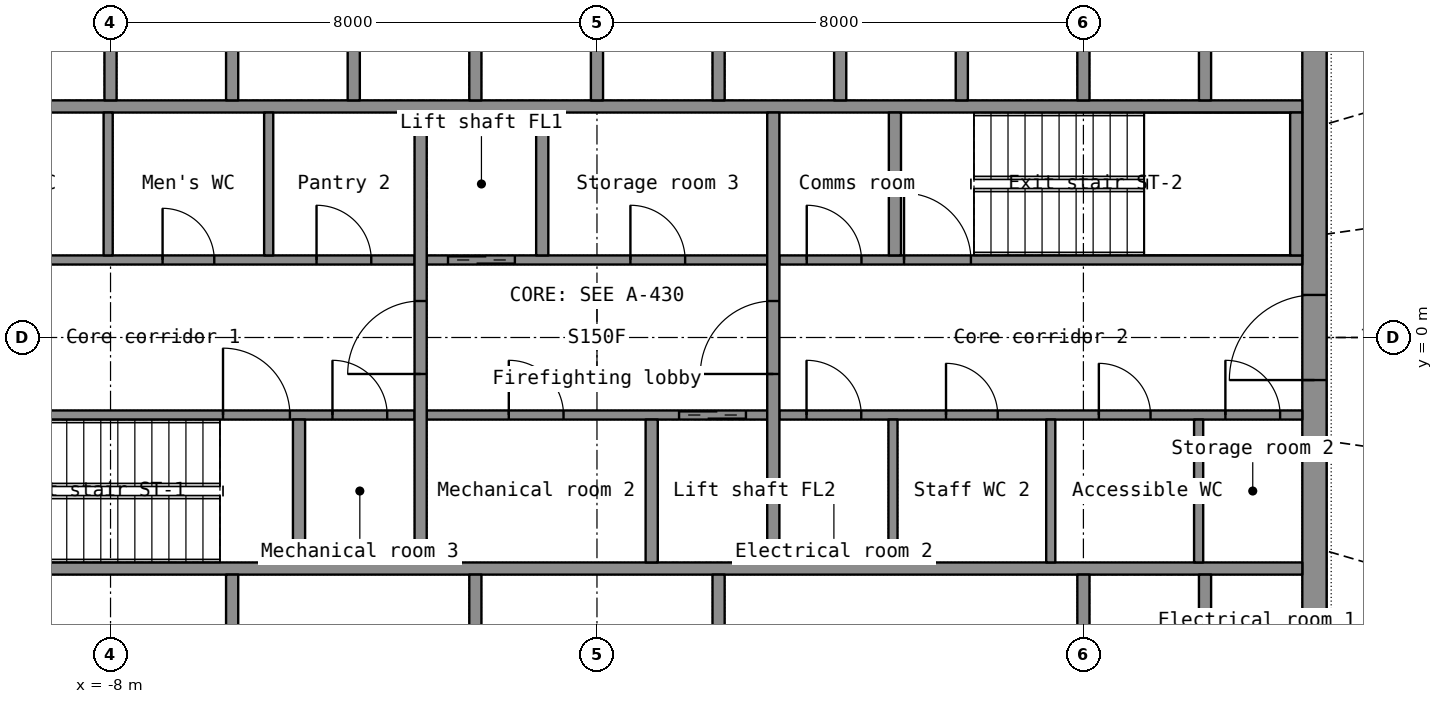
"""IFC4 building model, lengths in metres.
Left out: names, types, materials, properties, quantities, classifications, styles, units other than length and angle.
Written with IfcOpenShell. Run it as: python <this file> out.ifc"""

import sys

from ifc_helpers import new_model, si_unit, direction, frame, frame_2d, origin, place, context, subcontext, project, spatial, rectangle, extrude, element, fill, save


model = new_model("IFC4")
c1 = context("Model", 3, precision=1e-05, world=origin(), true_north=direction((0.0, 1.0)))
c2 = subcontext(c1, "Body", "Model", "MODEL_VIEW")
j1 = project(units=[si_unit("LENGTHUNIT", "METRE"), si_unit("PLANEANGLEUNIT", "RADIAN")], contexts=[c1])
p1 = place(None, origin())
s1 = spatial("IfcSite", under=j1, at=p1, CompositionType="ELEMENT")
p2 = place(p1, origin())
s2 = spatial("IfcBuilding", under=s1, at=p2, CompositionType="ELEMENT")
p3 = place(p2, frame((0.0, 0.0, 231.9)))
s3 = spatial("IfcBuildingStorey", under=s2, at=p3, CompositionType="ELEMENT", Elevation=231.9)
p4 = place(p3, frame((11.8, -7.2, 0.0), z_axis=(0.0, 0.0, 1.0), x_axis=(0.0, 1.0, 0.0)))
e1 = element("IfcWall", 1, at=p4, inside=s3, PredefinedType="SHEAR", context=c2, shape_type="SweptSolid", body=[
    extrude(rectangle(XDim=14.4, YDim=0.4, at=frame_2d((7.2, 0.0))), origin(), (0.0, 0.0, 1.0), 3.3),
])
p5 = place(p4, frame((6.5, 0.0, 0.0)))
e2 = element("IfcOpeningElement", 2, at=p5, cuts=e1, PredefinedType="OPENING", context=c2, shape_type="SweptSolid", body=[
    extrude(rectangle(XDim=1.4, YDim=2.2, at=frame_2d((0.7, 1.1))), frame((0.0, 0.21, 0.0), z_axis=(0.0, -1.0, 0.0), x_axis=(1.0, 0.0, 0.0)), (0.0, 0.0, 1.0), 0.42),
])
for number, where, z_axis, x_axis in (
    (3, (-11.6, -3.8, 0.0), (0.0, 0.0, 1.0), (1.0, 0.0, 0.0)),
    (4, (-11.6, 3.8, 0.0), (0.0, 0.0, 1.0), (1.0, 0.0, 0.0)),
):
    element("IfcWall", number, at=place(p3, frame(where, z_axis=z_axis, x_axis=x_axis)), inside=s3, PredefinedType="SHEAR", context=c2, shape_type="SweptSolid", body=[
        extrude(rectangle(XDim=23.2, YDim=0.2, at=frame_2d((11.6, 0.0))), origin(), (0.0, 0.0, 1.0), 3.3),
    ])
for number, where, z_axis, x_axis in (
    (5, (8.0, -6.8, 0.0), (0.0, 0.0, 1.0), (0.0, 1.0, 0.0)),
    (6, (10.0, -6.8, 0.0), (0.0, 0.0, 1.0), (0.0, 1.0, 0.0)),
):
    element("IfcWall", number, at=place(p3, frame(where, z_axis=z_axis, x_axis=x_axis)), inside=s3, PredefinedType="SHEAR", context=c2, shape_type="SweptSolid", body=[
        extrude(rectangle(XDim=2.9, YDim=0.2, at=frame_2d((1.45, 0.0))), origin(), (0.0, 0.0, 1.0), 3.3),
    ])
for number, where, z_axis, x_axis in (
    (7, (-6.0, -6.8, 0.0), (0.0, 0.0, 1.0), (0.0, 1.0, 0.0)),
    (8, (-2.0, -6.8, 0.0), (0.0, 0.0, 1.0), (0.0, 1.0, 0.0)),
    (9, (2.0, -6.8, 0.0), (0.0, 0.0, 1.0), (0.0, 1.0, 0.0)),
):
    element("IfcWall", number, at=place(p3, frame(where, z_axis=z_axis, x_axis=x_axis)), inside=s3, PredefinedType="PARTITIONING", context=c2, shape_type="SweptSolid", body=[
        extrude(rectangle(XDim=2.9, YDim=0.2, at=frame_2d((1.45, 0.0))), origin(), (0.0, 0.0, 1.0), 3.3),
    ])
for number, where, z_axis, x_axis in (
    (10, (-8.0, 3.9, 0.0), (0.0, 0.0, 1.0), (0.0, 1.0, 0.0)),
    (11, (-6.0, 3.9, 0.0), (0.0, 0.0, 1.0), (0.0, 1.0, 0.0)),
    (12, (-4.0, 3.9, 0.0), (0.0, 0.0, 1.0), (0.0, 1.0, 0.0)),
    (13, (-2.0, 3.9, 0.0), (0.0, 0.0, 1.0), (0.0, 1.0, 0.0)),
    (14, (0.0, 3.9, 0.0), (0.0, 0.0, 1.0), (0.0, 1.0, 0.0)),
    (15, (2.0, 3.9, 0.0), (0.0, 0.0, 1.0), (0.0, 1.0, 0.0)),
    (16, (4.0, 3.9, 0.0), (0.0, 0.0, 1.0), (0.0, 1.0, 0.0)),
    (17, (6.0, 3.9, 0.0), (0.0, 0.0, 1.0), (0.0, 1.0, 0.0)),
    (18, (8.0, 3.9, 0.0), (0.0, 0.0, 1.0), (0.0, 1.0, 0.0)),
    (19, (10.0, 3.9, 0.0), (0.0, 0.0, 1.0), (0.0, 1.0, 0.0)),
):
    element("IfcWall", number, at=place(p3, frame(where, z_axis=z_axis, x_axis=x_axis)), inside=s3, PredefinedType="SHEAR", context=c2, shape_type="SweptSolid", body=[
        extrude(rectangle(XDim=2.9, YDim=0.2, at=frame_2d((1.45, 0.0))), origin(), (0.0, 0.0, 1.0), 3.3),
    ])
p6 = place(p3, frame((-11.6, -1.275, 0.0), z_axis=(0.0, 0.0, 1.0), x_axis=(1.0, 0.0, 0.0)))
e20 = element("IfcWall", 20, at=p6, inside=s3, PredefinedType="SHEAR", context=c2, shape_type="SweptSolid", body=[
    extrude(rectangle(XDim=8.6, YDim=0.15, at=frame_2d((4.3, 0.0))), origin(), (0.0, 0.0, 1.0), 3.3),
])
p7 = place(p6, frame((5.45, 0.0, 0.0)))
e21 = element("IfcOpeningElement", 21, at=p7, cuts=e20, PredefinedType="OPENING", context=c2, shape_type="SweptSolid", body=[
    extrude(rectangle(XDim=1.1, YDim=2.15, at=frame_2d((0.55, 1.075))), frame((0.0, 0.085, 0.0), z_axis=(0.0, -1.0, 0.0), x_axis=(1.0, 0.0, 0.0)), (0.0, 0.0, 1.0), 0.17),
])
p8 = place(p6, frame((7.25, 0.0, 0.0)))
e22 = element("IfcOpeningElement", 22, at=p8, cuts=e20, PredefinedType="OPENING", context=c2, shape_type="SweptSolid", body=[
    extrude(rectangle(XDim=0.9, YDim=2.1, at=frame_2d((0.45, 1.05))), frame((0.0, 0.085, 0.0), z_axis=(0.0, -1.0, 0.0), x_axis=(1.0, 0.0, 0.0)), (0.0, 0.0, 1.0), 0.17),
])
p9 = place(p3, frame((-2.8, -1.275, 0.0), z_axis=(0.0, 0.0, 1.0), x_axis=(1.0, 0.0, 0.0)))
e23 = element("IfcWall", 23, at=p9, inside=s3, PredefinedType="SHEAR", context=c2, shape_type="SweptSolid", body=[
    extrude(rectangle(XDim=5.6, YDim=0.15, at=frame_2d((2.8, 0.0))), origin(), (0.0, 0.0, 1.0), 3.3),
])
p10 = place(p9, frame((4.15, 0.0, 0.0)))
e24 = element("IfcOpeningElement", 24, at=p10, cuts=e23, PredefinedType="OPENING", context=c2, shape_type="SweptSolid", body=[
    extrude(rectangle(XDim=1.1, YDim=2.2, at=frame_2d((0.55, 1.1))), frame((0.0, 0.085, 0.0), z_axis=(0.0, -1.0, 0.0), x_axis=(1.0, 0.0, 0.0)), (0.0, 0.0, 1.0), 0.17),
])
p11 = place(p9, frame((1.35, 0.0, 0.0)))
e25 = element("IfcOpeningElement", 25, at=p11, cuts=e23, PredefinedType="OPENING", context=c2, shape_type="SweptSolid", body=[
    extrude(rectangle(XDim=0.9, YDim=2.1, at=frame_2d((0.45, 1.05))), frame((0.0, 0.085, 0.0), z_axis=(0.0, -1.0, 0.0), x_axis=(1.0, 0.0, 0.0)), (0.0, 0.0, 1.0), 0.17),
])
p12 = place(p3, frame((3.0, -1.275, 0.0), z_axis=(0.0, 0.0, 1.0), x_axis=(1.0, 0.0, 0.0)))
e26 = element("IfcWall", 26, at=p12, inside=s3, PredefinedType="PARTITIONING", context=c2, shape_type="SweptSolid", body=[
    extrude(rectangle(XDim=8.6, YDim=0.15, at=frame_2d((4.3, 0.0))), origin(), (0.0, 0.0, 1.0), 3.3),
])
p13 = place(p12, frame((0.447, 0.0, 0.0)))
e27 = element("IfcOpeningElement", 27, at=p13, cuts=e26, PredefinedType="OPENING", context=c2, shape_type="SweptSolid", body=[
    extrude(rectangle(XDim=0.9, YDim=2.1, at=frame_2d((0.45, 1.05))), frame((0.0, 0.085, 0.0), z_axis=(0.0, -1.0, 0.0), x_axis=(1.0, 0.0, 0.0)), (0.0, 0.0, 1.0), 0.17),
])
p14 = place(p12, frame((2.74, 0.0, 0.0)))
e28 = element("IfcOpeningElement", 28, at=p14, cuts=e26, PredefinedType="OPENING", context=c2, shape_type="SweptSolid", body=[
    extrude(rectangle(XDim=0.85, YDim=2.1, at=frame_2d((0.425, 1.05))), frame((0.0, 0.085, 0.0), z_axis=(0.0, -1.0, 0.0), x_axis=(1.0, 0.0, 0.0)), (0.0, 0.0, 1.0), 0.17),
])
p15 = place(p12, frame((5.254, 0.0, 0.0)))
e29 = element("IfcOpeningElement", 29, at=p15, cuts=e26, PredefinedType="OPENING", context=c2, shape_type="SweptSolid", body=[
    extrude(rectangle(XDim=0.85, YDim=2.1, at=frame_2d((0.425, 1.05))), frame((0.0, 0.085, 0.0), z_axis=(0.0, -1.0, 0.0), x_axis=(1.0, 0.0, 0.0)), (0.0, 0.0, 1.0), 0.17),
])
p16 = place(p12, frame((7.335, 0.0, 0.0)))
e30 = element("IfcOpeningElement", 30, at=p16, cuts=e26, PredefinedType="OPENING", context=c2, shape_type="SweptSolid", body=[
    extrude(rectangle(XDim=0.9, YDim=2.1, at=frame_2d((0.45, 1.05))), frame((0.0, 0.085, 0.0), z_axis=(0.0, -1.0, 0.0), x_axis=(1.0, 0.0, 0.0)), (0.0, 0.0, 1.0), 0.17),
])
p17 = place(p3, frame((-11.6, 1.275, 0.0), z_axis=(0.0, 0.0, 1.0), x_axis=(1.0, 0.0, 0.0)))
e31 = element("IfcWall", 31, at=p17, inside=s3, PredefinedType="PARTITIONING", context=c2, shape_type="SweptSolid", body=[
    extrude(rectangle(XDim=8.6, YDim=0.15, at=frame_2d((4.3, 0.0))), origin(), (0.0, 0.0, 1.0), 3.3),
])
p18 = place(p17, frame((1.318, 0.0, 0.0)))
e32 = element("IfcOpeningElement", 32, at=p18, cuts=e31, PredefinedType="OPENING", context=c2, shape_type="SweptSolid", body=[
    extrude(rectangle(XDim=0.85, YDim=2.1, at=frame_2d((0.425, 1.05))), frame((0.0, 0.085, 0.0), z_axis=(0.0, -1.0, 0.0), x_axis=(1.0, 0.0, 0.0)), (0.0, 0.0, 1.0), 0.17),
])
p19 = place(p17, frame((4.456, 0.0, 0.0)))
e33 = element("IfcOpeningElement", 33, at=p19, cuts=e31, PredefinedType="OPENING", context=c2, shape_type="SweptSolid", body=[
    extrude(rectangle(XDim=0.85, YDim=2.1, at=frame_2d((0.425, 1.05))), frame((0.0, 0.085, 0.0), z_axis=(0.0, -1.0, 0.0), x_axis=(1.0, 0.0, 0.0)), (0.0, 0.0, 1.0), 0.17),
])
p20 = place(p17, frame((6.988, 0.0, 0.0)))
e34 = element("IfcOpeningElement", 34, at=p20, cuts=e31, PredefinedType="OPENING", context=c2, shape_type="SweptSolid", body=[
    extrude(rectangle(XDim=0.9, YDim=2.1, at=frame_2d((0.45, 1.05))), frame((0.0, 0.085, 0.0), z_axis=(0.0, -1.0, 0.0), x_axis=(1.0, 0.0, 0.0)), (0.0, 0.0, 1.0), 0.17),
])
p21 = place(p3, frame((-2.8, 1.275, 0.0), z_axis=(0.0, 0.0, 1.0), x_axis=(1.0, 0.0, 0.0)))
e35 = element("IfcWall", 35, at=p21, inside=s3, PredefinedType="SHEAR", context=c2, shape_type="SweptSolid", body=[
    extrude(rectangle(XDim=5.6, YDim=0.15, at=frame_2d((2.8, 0.0))), origin(), (0.0, 0.0, 1.0), 3.3),
])
p22 = place(p21, frame((0.35, 0.0, 0.0)))
e36 = element("IfcOpeningElement", 36, at=p22, cuts=e35, PredefinedType="OPENING", context=c2, shape_type="SweptSolid", body=[
    extrude(rectangle(XDim=1.1, YDim=2.2, at=frame_2d((0.55, 1.1))), frame((0.0, 0.085, 0.0), z_axis=(0.0, -1.0, 0.0), x_axis=(1.0, 0.0, 0.0)), (0.0, 0.0, 1.0), 0.17),
])
p23 = place(p21, frame((3.35, 0.0, 0.0)))
e37 = element("IfcOpeningElement", 37, at=p23, cuts=e35, PredefinedType="OPENING", context=c2, shape_type="SweptSolid", body=[
    extrude(rectangle(XDim=0.9, YDim=2.1, at=frame_2d((0.45, 1.05))), frame((0.0, 0.085, 0.0), z_axis=(0.0, -1.0, 0.0), x_axis=(1.0, 0.0, 0.0)), (0.0, 0.0, 1.0), 0.17),
])
p24 = place(p3, frame((3.0, 1.275, 0.0), z_axis=(0.0, 0.0, 1.0), x_axis=(1.0, 0.0, 0.0)))
e38 = element("IfcWall", 38, at=p24, inside=s3, PredefinedType="SHEAR", context=c2, shape_type="SweptSolid", body=[
    extrude(rectangle(XDim=8.6, YDim=0.15, at=frame_2d((4.3, 0.0))), origin(), (0.0, 0.0, 1.0), 3.3),
])
p25 = place(p24, frame((2.05, 0.0, 0.0)))
e39 = element("IfcOpeningElement", 39, at=p25, cuts=e38, PredefinedType="OPENING", context=c2, shape_type="SweptSolid", body=[
    extrude(rectangle(XDim=1.1, YDim=2.15, at=frame_2d((0.55, 1.075))), frame((0.0, 0.085, 0.0), z_axis=(0.0, -1.0, 0.0), x_axis=(1.0, 0.0, 0.0)), (0.0, 0.0, 1.0), 0.17),
])
p26 = place(p24, frame((0.45, 0.0, 0.0)))
e40 = element("IfcOpeningElement", 40, at=p26, cuts=e38, PredefinedType="OPENING", context=c2, shape_type="SweptSolid", body=[
    extrude(rectangle(XDim=0.9, YDim=2.1, at=frame_2d((0.45, 1.05))), frame((0.0, 0.085, 0.0), z_axis=(0.0, -1.0, 0.0), x_axis=(1.0, 0.0, 0.0)), (0.0, 0.0, 1.0), 0.17),
])
p27 = place(p3, frame((-2.9, -3.7, 0.0), z_axis=(0.0, 0.0, 1.0), x_axis=(0.0, 1.0, 0.0)))
e41 = element("IfcWall", 41, at=p27, inside=s3, PredefinedType="SHEAR", context=c2, shape_type="SweptSolid", body=[
    extrude(rectangle(XDim=7.4, YDim=0.2, at=frame_2d((3.7, 0.0))), origin(), (0.0, 0.0, 1.0), 3.3),
])
p28 = place(p27, frame((3.1, 0.0, 0.0)))
e42 = element("IfcOpeningElement", 42, at=p28, cuts=e41, PredefinedType="OPENING", context=c2, shape_type="SweptSolid", body=[
    extrude(rectangle(XDim=1.2, YDim=2.2, at=frame_2d((0.6, 1.1))), frame((0.0, 0.11, 0.0), z_axis=(0.0, -1.0, 0.0), x_axis=(1.0, 0.0, 0.0)), (0.0, 0.0, 1.0), 0.22),
])
p29 = place(p3, frame((2.9, -3.7, 0.0), z_axis=(0.0, 0.0, 1.0), x_axis=(0.0, 1.0, 0.0)))
e43 = element("IfcWall", 43, at=p29, inside=s3, PredefinedType="SHEAR", context=c2, shape_type="SweptSolid", body=[
    extrude(rectangle(XDim=7.4, YDim=0.2, at=frame_2d((3.7, 0.0))), origin(), (0.0, 0.0, 1.0), 3.3),
])
p30 = place(p29, frame((3.1, 0.0, 0.0)))
e44 = element("IfcOpeningElement", 44, at=p30, cuts=e43, PredefinedType="OPENING", context=c2, shape_type="SweptSolid", body=[
    extrude(rectangle(XDim=1.2, YDim=2.2, at=frame_2d((0.6, 1.1))), frame((0.0, 0.11, 0.0), z_axis=(0.0, -1.0, 0.0), x_axis=(1.0, 0.0, 0.0)), (0.0, 0.0, 1.0), 0.22),
])
for number, where, z_axis, x_axis in (
    (45, (-0.9, 1.35, 0.0), (0.0, 0.0, 1.0), (0.0, 1.0, 0.0)),
    (46, (0.9, -3.7, 0.0), (0.0, 0.0, 1.0), (0.0, 1.0, 0.0)),
    (47, (11.5, 1.35, 0.0), (0.0, 0.0, 1.0), (0.0, 1.0, 0.0)),
    (48, (-4.9, -3.7, 0.0), (0.0, 0.0, 1.0), (0.0, 1.0, 0.0)),
    (49, (4.9, 1.35, 0.0), (0.0, 0.0, 1.0), (0.0, 1.0, 0.0)),
):
    element("IfcWall", number, at=place(p3, frame(where, z_axis=z_axis, x_axis=x_axis)), inside=s3, PredefinedType="SHEAR", context=c2, shape_type="SweptSolid", body=[
        extrude(rectangle(XDim=2.35, YDim=0.2, at=frame_2d((1.175, 0.0))), origin(), (0.0, 0.0, 1.0), 3.3),
    ])
for number, where, z_axis, x_axis in (
    (50, (-8.039, 1.35, 0.0), (0.0, 0.0, 1.0), (0.0, 1.0, 0.0)),
    (51, (-5.399, 1.35, 0.0), (0.0, 0.0, 1.0), (0.0, 1.0, 0.0)),
    (52, (4.868, -3.7, 0.0), (0.0, 0.0, 1.0), (0.0, 1.0, 0.0)),
    (53, (7.463, -3.7, 0.0), (0.0, 0.0, 1.0), (0.0, 1.0, 0.0)),
    (54, (9.895, -3.7, 0.0), (0.0, 0.0, 1.0), (0.0, 1.0, 0.0)),
):
    element("IfcWall", number, at=place(p3, frame(where, z_axis=z_axis, x_axis=x_axis)), inside=s3, PredefinedType="PARTITIONING", context=c2, shape_type="SweptSolid", body=[
        extrude(rectangle(XDim=2.35, YDim=0.15, at=frame_2d((1.175, 0.0))), origin(), (0.0, 0.0, 1.0), 3.3),
    ])
p31 = place(p5, origin())
e55 = element("IfcDoor", 55, at=p31, inside=s3, OperationType="DOUBLE_DOOR_SINGLE_SWING", PredefinedType="DOOR", context=c2, shape_type="SweptSolid", body=[
    extrude(rectangle(XDim=1.4, YDim=2.2, at=frame_2d((0.7, 1.1))), frame((0.0, 0.025, 0.0), z_axis=(0.0, -1.0, 0.0), x_axis=(1.0, 0.0, 0.0)), (0.0, 0.0, 1.0), 0.05),
])
fill(e2, e55)
p32 = place(p28, origin())
e56 = element("IfcDoor", 56, at=p32, inside=s3, OperationType="SINGLE_SWING_LEFT", PredefinedType="DOOR", context=c2, shape_type="SweptSolid", body=[
    extrude(rectangle(XDim=1.2, YDim=2.2, at=frame_2d((0.6, 1.1))), frame((0.0, 0.025, 0.0), z_axis=(0.0, -1.0, 0.0), x_axis=(1.0, 0.0, 0.0)), (0.0, 0.0, 1.0), 0.05),
])
fill(e42, e56)
p33 = place(p30, origin())
e57 = element("IfcDoor", 57, at=p33, inside=s3, OperationType="SINGLE_SWING_LEFT", PredefinedType="DOOR", context=c2, shape_type="SweptSolid", body=[
    extrude(rectangle(XDim=1.2, YDim=2.2, at=frame_2d((0.6, 1.1))), frame((0.0, 0.025, 0.0), z_axis=(0.0, -1.0, 0.0), x_axis=(1.0, 0.0, 0.0)), (0.0, 0.0, 1.0), 0.05),
])
fill(e44, e57)
p34 = place(p22, origin())
e58 = element("IfcDoor", 58, at=p34, inside=s3, OperationType="DOUBLE_DOOR_SLIDING", PredefinedType="DOOR", context=c2, shape_type="SweptSolid", body=[
    extrude(rectangle(XDim=1.1, YDim=2.2, at=frame_2d((0.55, 1.1))), frame((0.0, 0.025, 0.0), z_axis=(0.0, -1.0, 0.0), x_axis=(1.0, 0.0, 0.0)), (0.0, 0.0, 1.0), 0.05),
])
fill(e36, e58)
p35 = place(p10, origin())
e59 = element("IfcDoor", 59, at=p35, inside=s3, OperationType="DOUBLE_DOOR_SLIDING", PredefinedType="DOOR", context=c2, shape_type="SweptSolid", body=[
    extrude(rectangle(XDim=1.1, YDim=2.2, at=frame_2d((0.55, 1.1))), frame((0.0, 0.025, 0.0), z_axis=(0.0, -1.0, 0.0), x_axis=(1.0, 0.0, 0.0)), (0.0, 0.0, 1.0), 0.05),
])
fill(e24, e59)
p36 = place(p7, origin())
e60 = element("IfcDoor", 60, at=p36, inside=s3, OperationType="SINGLE_SWING_LEFT", PredefinedType="DOOR", context=c2, shape_type="SweptSolid", body=[
    extrude(rectangle(XDim=1.1, YDim=2.15, at=frame_2d((0.55, 1.075))), frame((0.0, 0.025, 0.0), z_axis=(0.0, -1.0, 0.0), x_axis=(1.0, 0.0, 0.0)), (0.0, 0.0, 1.0), 0.05),
])
fill(e21, e60)
p37 = place(p25, origin())
e61 = element("IfcDoor", 61, at=p37, inside=s3, OperationType="SINGLE_SWING_LEFT", PredefinedType="DOOR", context=c2, shape_type="SweptSolid", body=[
    extrude(rectangle(XDim=1.1, YDim=2.15, at=frame_2d((0.55, 1.075))), frame((0.0, 0.025, 0.0), z_axis=(0.0, -1.0, 0.0), x_axis=(1.0, 0.0, 0.0)), (0.0, 0.0, 1.0), 0.05),
])
fill(e39, e61)
p38 = place(p19, origin())
e62 = element("IfcDoor", 62, at=p38, inside=s3, OperationType="SINGLE_SWING_LEFT", PredefinedType="DOOR", context=c2, shape_type="SweptSolid", body=[
    extrude(rectangle(XDim=0.85, YDim=2.1, at=frame_2d((0.425, 1.05))), frame((0.0, 0.025, 0.0), z_axis=(0.0, -1.0, 0.0), x_axis=(1.0, 0.0, 0.0)), (0.0, 0.0, 1.0), 0.05),
])
fill(e33, e62)
p39 = place(p20, origin())
e63 = element("IfcDoor", 63, at=p39, inside=s3, OperationType="SINGLE_SWING_LEFT", PredefinedType="DOOR", context=c2, shape_type="SweptSolid", body=[
    extrude(rectangle(XDim=0.9, YDim=2.1, at=frame_2d((0.45, 1.05))), frame((0.0, 0.025, 0.0), z_axis=(0.0, -1.0, 0.0), x_axis=(1.0, 0.0, 0.0)), (0.0, 0.0, 1.0), 0.05),
])
fill(e34, e63)
p40 = place(p13, origin())
e64 = element("IfcDoor", 64, at=p40, inside=s3, OperationType="SINGLE_SWING_LEFT", PredefinedType="DOOR", context=c2, shape_type="SweptSolid", body=[
    extrude(rectangle(XDim=0.9, YDim=2.1, at=frame_2d((0.45, 1.05))), frame((0.0, 0.025, 0.0), z_axis=(0.0, -1.0, 0.0), x_axis=(1.0, 0.0, 0.0)), (0.0, 0.0, 1.0), 0.05),
])
fill(e27, e64)
p41 = place(p14, origin())
e65 = element("IfcDoor", 65, at=p41, inside=s3, OperationType="SINGLE_SWING_LEFT", PredefinedType="DOOR", context=c2, shape_type="SweptSolid", body=[
    extrude(rectangle(XDim=0.85, YDim=2.1, at=frame_2d((0.425, 1.05))), frame((0.0, 0.025, 0.0), z_axis=(0.0, -1.0, 0.0), x_axis=(1.0, 0.0, 0.0)), (0.0, 0.0, 1.0), 0.05),
])
fill(e28, e65)
p42 = place(p15, origin())
e66 = element("IfcDoor", 66, at=p42, inside=s3, OperationType="SINGLE_SWING_LEFT", PredefinedType="DOOR", context=c2, shape_type="SweptSolid", body=[
    extrude(rectangle(XDim=0.85, YDim=2.1, at=frame_2d((0.425, 1.05))), frame((0.0, 0.025, 0.0), z_axis=(0.0, -1.0, 0.0), x_axis=(1.0, 0.0, 0.0)), (0.0, 0.0, 1.0), 0.05),
])
fill(e29, e66)
p43 = place(p16, origin())
e67 = element("IfcDoor", 67, at=p43, inside=s3, OperationType="SINGLE_SWING_LEFT", PredefinedType="DOOR", context=c2, shape_type="SweptSolid", body=[
    extrude(rectangle(XDim=0.9, YDim=2.1, at=frame_2d((0.45, 1.05))), frame((0.0, 0.025, 0.0), z_axis=(0.0, -1.0, 0.0), x_axis=(1.0, 0.0, 0.0)), (0.0, 0.0, 1.0), 0.05),
])
fill(e30, e67)
p44 = place(p23, origin())
e68 = element("IfcDoor", 68, at=p44, inside=s3, OperationType="SINGLE_SWING_LEFT", PredefinedType="DOOR", context=c2, shape_type="SweptSolid", body=[
    extrude(rectangle(XDim=0.9, YDim=2.1, at=frame_2d((0.45, 1.05))), frame((0.0, 0.025, 0.0), z_axis=(0.0, -1.0, 0.0), x_axis=(1.0, 0.0, 0.0)), (0.0, 0.0, 1.0), 0.05),
])
fill(e37, e68)
p45 = place(p11, origin())
e69 = element("IfcDoor", 69, at=p45, inside=s3, OperationType="SINGLE_SWING_LEFT", PredefinedType="DOOR", context=c2, shape_type="SweptSolid", body=[
    extrude(rectangle(XDim=0.9, YDim=2.1, at=frame_2d((0.45, 1.05))), frame((0.0, 0.025, 0.0), z_axis=(0.0, -1.0, 0.0), x_axis=(1.0, 0.0, 0.0)), (0.0, 0.0, 1.0), 0.05),
])
fill(e25, e69)
p46 = place(p26, origin())
e70 = element("IfcDoor", 70, at=p46, inside=s3, OperationType="SINGLE_SWING_LEFT", PredefinedType="DOOR", context=c2, shape_type="SweptSolid", body=[
    extrude(rectangle(XDim=0.9, YDim=2.1, at=frame_2d((0.45, 1.05))), frame((0.0, 0.025, 0.0), z_axis=(0.0, -1.0, 0.0), x_axis=(1.0, 0.0, 0.0)), (0.0, 0.0, 1.0), 0.05),
])
fill(e40, e70)
p47 = place(p8, origin())
e71 = element("IfcDoor", 71, at=p47, inside=s3, OperationType="SINGLE_SWING_LEFT", PredefinedType="DOOR", context=c2, shape_type="SweptSolid", body=[
    extrude(rectangle(XDim=0.9, YDim=2.1, at=frame_2d((0.45, 1.05))), frame((0.0, 0.025, 0.0), z_axis=(0.0, -1.0, 0.0), x_axis=(1.0, 0.0, 0.0)), (0.0, 0.0, 1.0), 0.05),
])
fill(e22, e71)
save(model, sys.argv[1])
